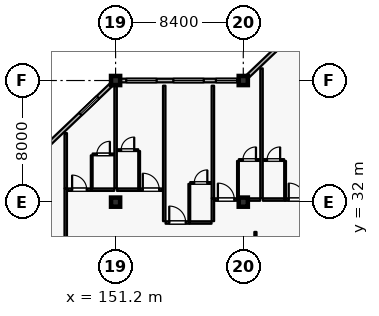
"""IFC4 building model, lengths in metres.
Left out: names, types, materials, properties, quantities, classifications, styles, units other than length and angle.
Written with IfcOpenShell. Run it as: python <this file> out.ifc"""

import sys

from ifc_helpers import new_model, si_unit, direction, frame, frame_2d, origin, origin_2d, place, context, subcontext, project, spatial, rectangle, extrude, element, fill, save


model = new_model("IFC4")
c1 = context("Model", 3, precision=1e-05, world=origin(), true_north=direction((0.0, 1.0)))
c2 = subcontext(c1, "Body", "Model", "MODEL_VIEW")
j1 = project(units=[si_unit("LENGTHUNIT", "METRE"), si_unit("PLANEANGLEUNIT", "RADIAN")], contexts=[c1])
p1 = place(None, origin())
s1 = spatial("IfcSite", under=j1, at=p1, CompositionType="ELEMENT")
p2 = place(p1, origin())
s2 = spatial("IfcBuilding", under=s1, at=p2, CompositionType="ELEMENT")
p3 = place(p2, frame((0.0, 0.0, 39.6)))
s3 = spatial("IfcBuildingStorey", under=s2, at=p3, CompositionType="ELEMENT", Elevation=39.6)
for number, where, z_axis, x_axis in (
    (1, (151.2, 40.0, 0.0), (0.0, 0.0, 1.0), (1.0, 0.0, 0.0)),
    (2, (159.6, 40.0, 0.0), (0.0, 0.0, 1.0), (1.0, 0.0, 0.0)),
    (3, (151.2, 32.0, 0.0), (0.0, 0.0, 1.0), (1.0, 0.0, 0.0)),
    (4, (159.6, 32.0, 0.0), (0.0, 0.0, 1.0), (1.0, 0.0, 0.0)),
):
    element("IfcColumn", number, at=place(p3, frame(where, z_axis=z_axis, x_axis=x_axis)), inside=s3, PredefinedType="COLUMN", context=c2, shape_type="SweptSolid", body=[
        extrude(rectangle(XDim=0.6, YDim=0.6, at=origin_2d()), origin(), (0.0, 0.0, 1.0), 3.6),
    ])
p4 = place(p3, frame((143.1, 32.286, 0.0), z_axis=(0.0, 0.0, 1.0), x_axis=(0.724145477467, 0.689647248573, 0.0)))
e5 = element("IfcWall", 5, at=p4, inside=s3, PredefinedType="SOLIDWALL", context=c2, shape_type="SweptSolid", body=[
    extrude(rectangle(XDim=10.771, YDim=0.24, at=frame_2d((5.385, 0.0))), origin(), (0.0, 0.0, 1.0), 2.94),
])
p5 = place(p4, frame((0.194, 0.0, 0.8)))
e6 = element("IfcOpeningElement", 6, at=p5, cuts=e5, PredefinedType="OPENING", context=c2, shape_type="SweptSolid", body=[
    extrude(rectangle(XDim=1.6, YDim=1.6, at=frame_2d((0.8, 0.8))), frame((0.0, 0.13, 0.0), z_axis=(0.0, -1.0, 0.0), x_axis=(1.0, 0.0, 0.0)), (0.0, 0.0, 1.0), 0.26),
])
p6 = place(p4, frame((3.591, 0.0, 0.8)))
e7 = element("IfcOpeningElement", 7, at=p6, cuts=e5, PredefinedType="OPENING", context=c2, shape_type="SweptSolid", body=[
    extrude(rectangle(XDim=1.6, YDim=1.6, at=frame_2d((0.8, 0.8))), frame((0.0, 0.13, 0.0), z_axis=(0.0, -1.0, 0.0), x_axis=(1.0, 0.0, 0.0)), (0.0, 0.0, 1.0), 0.26),
])
p7 = place(p4, frame((7.983, 0.0, 0.8)))
e8 = element("IfcOpeningElement", 8, at=p7, cuts=e5, PredefinedType="OPENING", context=c2, shape_type="SweptSolid", body=[
    extrude(rectangle(XDim=1.6, YDim=1.6, at=frame_2d((0.8, 0.8))), frame((0.0, 0.13, 0.0), z_axis=(0.0, -1.0, 0.0), x_axis=(1.0, 0.0, 0.0)), (0.0, 0.0, 1.0), 0.26),
])
p8 = place(p3, frame((151.5, 40.0, 0.0), z_axis=(0.0, 0.0, 1.0), x_axis=(1.0, 0.0, 0.0)))
e9 = element("IfcWall", 9, at=p8, inside=s3, PredefinedType="SOLIDWALL", context=c2, shape_type="SweptSolid", body=[
    extrude(rectangle(XDim=7.8, YDim=0.24, at=frame_2d((3.9, 0.0))), origin(), (0.0, 0.0, 1.0), 2.94),
])
p9 = place(p8, frame((0.4, 0.0, 0.8)))
e10 = element("IfcOpeningElement", 10, at=p9, cuts=e9, PredefinedType="OPENING", context=c2, shape_type="SweptSolid", body=[
    extrude(rectangle(XDim=2.0, YDim=1.75, at=frame_2d((1.0, 0.875))), frame((0.0, 0.13, 0.0), z_axis=(0.0, -1.0, 0.0), x_axis=(1.0, 0.0, 0.0)), (0.0, 0.0, 1.0), 0.26),
])
p10 = place(p8, frame((3.5, 0.0, 0.8)))
e11 = element("IfcOpeningElement", 11, at=p10, cuts=e9, PredefinedType="OPENING", context=c2, shape_type="SweptSolid", body=[
    extrude(rectangle(XDim=2.0, YDim=1.75, at=frame_2d((1.0, 0.875))), frame((0.0, 0.13, 0.0), z_axis=(0.0, -1.0, 0.0), x_axis=(1.0, 0.0, 0.0)), (0.0, 0.0, 1.0), 0.26),
])
p11 = place(p8, frame((6.3, 0.0, 0.8)))
e12 = element("IfcOpeningElement", 12, at=p11, cuts=e9, PredefinedType="OPENING", context=c2, shape_type="SweptSolid", body=[
    extrude(rectangle(XDim=1.4, YDim=1.6, at=frame_2d((0.7, 0.8))), frame((0.0, 0.13, 0.0), z_axis=(0.0, -1.0, 0.0), x_axis=(1.0, 0.0, 0.0)), (0.0, 0.0, 1.0), 0.26),
])
p12 = place(p3, frame((159.9, 40.286, 0.0), z_axis=(0.0, 0.0, 1.0), x_axis=(0.724156257633, 0.689635928973, 0.0)))
e13 = element("IfcWall", 13, at=p12, inside=s3, PredefinedType="SOLIDWALL", context=c2, shape_type="SweptSolid", body=[
    extrude(rectangle(XDim=10.771, YDim=0.24, at=frame_2d((5.386, 0.0))), origin(), (0.0, 0.0, 1.0), 2.94),
])
p13 = place(p12, frame((2.452, 0.0, 0.8)))
e14 = element("IfcOpeningElement", 14, at=p13, cuts=e13, PredefinedType="OPENING", context=c2, shape_type="SweptSolid", body=[
    extrude(rectangle(XDim=2.0, YDim=1.75, at=frame_2d((1.0, 0.875))), frame((0.0, 0.13, 0.0), z_axis=(0.0, -1.0, 0.0), x_axis=(1.0, 0.0, 0.0)), (0.0, 0.0, 1.0), 0.26),
])
p14 = place(p12, frame((6.871, 0.0, 0.8)))
e15 = element("IfcOpeningElement", 15, at=p14, cuts=e13, PredefinedType="OPENING", context=c2, shape_type="SweptSolid", body=[
    extrude(rectangle(XDim=2.0, YDim=1.75, at=frame_2d((1.0, 0.875))), frame((0.0, 0.13, 0.0), z_axis=(0.0, -1.0, 0.0), x_axis=(1.0, 0.0, 0.0)), (0.0, 0.0, 1.0), 0.26),
])
p15 = place(p3, frame((147.92, 28.46, 0.0), z_axis=(0.0, 0.0, 1.0), x_axis=(0.0, 1.0, 0.0)))
e16 = element("IfcWall", 16, at=p15, inside=s3, PredefinedType="PARTITIONING", context=c2, shape_type="SweptSolid", body=[
    extrude(rectangle(XDim=4.44, YDim=0.16, at=frame_2d((2.22, 0.0))), origin(), (0.0, 0.0, 1.0), 3.335),
])
p16 = place(p3, frame((148.01, 32.82, 0.0), z_axis=(0.0, 0.0, 1.0), x_axis=(1.0, 0.0, 0.0)))
e17 = element("IfcWall", 17, at=p16, inside=s3, PredefinedType="PARTITIONING", context=c2, shape_type="SweptSolid", body=[
    extrude(rectangle(XDim=1.62, YDim=0.16, at=frame_2d((0.81, 0.0))), origin(), (0.0, 0.0, 1.0), 3.335),
])
p17 = place(p16, frame((0.33, 0.0, 0.0)))
e18 = element("IfcOpeningElement", 18, at=p17, cuts=e17, PredefinedType="OPENING", context=c2, shape_type="SweptSolid", body=[
    extrude(rectangle(XDim=0.96, YDim=2.2, at=frame_2d((0.48, 1.1))), frame((0.0, 0.09, 0.0), z_axis=(0.0, -1.0, 0.0), x_axis=(1.0, 0.0, 0.0)), (0.0, 0.0, 1.0), 0.18),
])
p18 = place(p3, frame((149.64, 32.82, 0.0), z_axis=(0.0, 0.0, 1.0), x_axis=(1.0, 0.0, 0.0)))
e19 = element("IfcWall", 19, at=p18, inside=s3, PredefinedType="PARTITIONING", context=c2, shape_type="SweptSolid", body=[
    extrude(rectangle(XDim=1.47, YDim=0.16, at=frame_2d((0.735, 0.0))), origin(), (0.0, 0.0, 1.0), 3.335),
])
p19 = place(p3, frame((149.63, 32.91, 0.0), z_axis=(0.0, 0.0, 1.0), x_axis=(0.0, 1.0, 0.0)))
e20 = element("IfcWall", 20, at=p19, inside=s3, PredefinedType="PARTITIONING", context=c2, shape_type="SweptSolid", body=[
    extrude(rectangle(XDim=2.17, YDim=0.115, at=frame_2d((1.085, 0.0))), origin(), (0.0, 0.0, 1.0), 3.335),
])
p20 = place(p3, frame((149.69, 35.14, 0.0), z_axis=(0.0, 0.0, 1.0), x_axis=(1.0, 0.0, 0.0)))
e21 = element("IfcWall", 21, at=p20, inside=s3, PredefinedType="PARTITIONING", context=c2, shape_type="SweptSolid", body=[
    extrude(rectangle(XDim=1.41, YDim=0.115, at=frame_2d((0.705, 0.0))), origin(), (0.0, 0.0, 1.0), 3.335),
])
p21 = place(p20, frame((0.275, 0.0, 0.0)))
e22 = element("IfcOpeningElement", 22, at=p21, cuts=e21, PredefinedType="OPENING", context=c2, shape_type="SweptSolid", body=[
    extrude(rectangle(XDim=0.86, YDim=2.12, at=frame_2d((0.43, 1.06))), frame((0.0, 0.067, 0.0), z_axis=(0.0, -1.0, 0.0), x_axis=(1.0, 0.0, 0.0)), (0.0, 0.0, 1.0), 0.135),
])
p22 = place(p3, frame((147.92, 32.91, 0.0), z_axis=(0.0, 0.0, 1.0), x_axis=(0.0, 1.0, 0.0)))
e23 = element("IfcWall", 23, at=p22, inside=s3, PredefinedType="PARTITIONING", context=c2, shape_type="SweptSolid", body=[
    extrude(rectangle(XDim=3.63, YDim=0.16, at=frame_2d((1.815, 0.0))), origin(), (0.0, 0.0, 1.0), 3.335),
])
p23 = place(p3, frame((151.29, 32.82, 0.0), z_axis=(0.0, 0.0, 1.0), x_axis=(1.0, 0.0, 0.0)))
e24 = element("IfcWall", 24, at=p23, inside=s3, PredefinedType="PARTITIONING", context=c2, shape_type="SweptSolid", body=[
    extrude(rectangle(XDim=1.45, YDim=0.16, at=frame_2d((0.725, 0.0))), origin(), (0.0, 0.0, 1.0), 3.335),
])
p24 = place(p3, frame((152.75, 32.82, 0.0), z_axis=(0.0, 0.0, 1.0), x_axis=(1.0, 0.0, 0.0)))
e25 = element("IfcWall", 25, at=p24, inside=s3, PredefinedType="PARTITIONING", context=c2, shape_type="SweptSolid", body=[
    extrude(rectangle(XDim=1.56, YDim=0.16, at=frame_2d((0.78, 0.0))), origin(), (0.0, 0.0, 1.0), 3.335),
])
p25 = place(p24, frame((0.24, 0.0, 0.0)))
e26 = element("IfcOpeningElement", 26, at=p25, cuts=e25, PredefinedType="OPENING", context=c2, shape_type="SweptSolid", body=[
    extrude(rectangle(XDim=1.08, YDim=2.3, at=frame_2d((0.54, 1.15))), frame((0.0, 0.09, 0.0), z_axis=(0.0, -1.0, 0.0), x_axis=(1.0, 0.0, 0.0)), (0.0, 0.0, 1.0), 0.18),
])
p26 = place(p3, frame((152.75, 32.91, 0.0), z_axis=(0.0, 0.0, 1.0), x_axis=(0.0, 1.0, 0.0)))
e27 = element("IfcWall", 27, at=p26, inside=s3, PredefinedType="PARTITIONING", context=c2, shape_type="SweptSolid", body=[
    extrude(rectangle(XDim=2.45, YDim=0.115, at=frame_2d((1.225, 0.0))), origin(), (0.0, 0.0, 1.0), 3.335),
])
p27 = place(p3, frame((151.3, 35.42, 0.0), z_axis=(0.0, 0.0, 1.0), x_axis=(1.0, 0.0, 0.0)))
e28 = element("IfcWall", 28, at=p27, inside=s3, PredefinedType="PARTITIONING", context=c2, shape_type="SweptSolid", body=[
    extrude(rectangle(XDim=1.39, YDim=0.115, at=frame_2d((0.695, 0.0))), origin(), (0.0, 0.0, 1.0), 3.335),
])
p28 = place(p27, frame((0.265, 0.0, 0.0)))
e29 = element("IfcOpeningElement", 29, at=p28, cuts=e28, PredefinedType="OPENING", context=c2, shape_type="SweptSolid", body=[
    extrude(rectangle(XDim=0.86, YDim=2.12, at=frame_2d((0.43, 1.06))), frame((0.0, 0.067, 0.0), z_axis=(0.0, -1.0, 0.0), x_axis=(1.0, 0.0, 0.0)), (0.0, 0.0, 1.0), 0.135),
])
p29 = place(p3, frame((151.2, 32.91, 0.0), z_axis=(0.0, 0.0, 1.0), x_axis=(0.0, 1.0, 0.0)))
e30 = element("IfcWall", 30, at=p29, inside=s3, PredefinedType="PARTITIONING", context=c2, shape_type="SweptSolid", body=[
    extrude(rectangle(XDim=6.75, YDim=0.16, at=frame_2d((3.375, 0.0))), origin(), (0.0, 0.0, 1.0), 2.74),
])
p30 = place(p3, frame((154.49, 30.66, 0.0), z_axis=(0.0, 0.0, 1.0), x_axis=(1.0, 0.0, 0.0)))
e31 = element("IfcWall", 31, at=p30, inside=s3, PredefinedType="PARTITIONING", context=c2, shape_type="SweptSolid", body=[
    extrude(rectangle(XDim=1.56, YDim=0.16, at=frame_2d((0.78, 0.0))), origin(), (0.0, 0.0, 1.0), 3.335),
])
p31 = place(p30, frame((0.24, 0.0, 0.0)))
e32 = element("IfcOpeningElement", 32, at=p31, cuts=e31, PredefinedType="OPENING", context=c2, shape_type="SweptSolid", body=[
    extrude(rectangle(XDim=1.08, YDim=2.3, at=frame_2d((0.54, 1.15))), frame((0.0, 0.09, 0.0), z_axis=(0.0, -1.0, 0.0), x_axis=(1.0, 0.0, 0.0)), (0.0, 0.0, 1.0), 0.18),
])
p32 = place(p3, frame((156.06, 30.66, 0.0), z_axis=(0.0, 0.0, 1.0), x_axis=(1.0, 0.0, 0.0)))
e33 = element("IfcWall", 33, at=p32, inside=s3, PredefinedType="PARTITIONING", context=c2, shape_type="SweptSolid", body=[
    extrude(rectangle(XDim=1.45, YDim=0.16, at=frame_2d((0.725, 0.0))), origin(), (0.0, 0.0, 1.0), 3.335),
])
p33 = place(p3, frame((156.05, 30.75, 0.0), z_axis=(0.0, 0.0, 1.0), x_axis=(0.0, 1.0, 0.0)))
e34 = element("IfcWall", 34, at=p33, inside=s3, PredefinedType="PARTITIONING", context=c2, shape_type="SweptSolid", body=[
    extrude(rectangle(XDim=2.45, YDim=0.115, at=frame_2d((1.225, 0.0))), origin(), (0.0, 0.0, 1.0), 3.335),
])
p34 = place(p3, frame((156.11, 33.26, 0.0), z_axis=(0.0, 0.0, 1.0), x_axis=(1.0, 0.0, 0.0)))
e35 = element("IfcWall", 35, at=p34, inside=s3, PredefinedType="PARTITIONING", context=c2, shape_type="SweptSolid", body=[
    extrude(rectangle(XDim=1.39, YDim=0.115, at=frame_2d((0.695, 0.0))), origin(), (0.0, 0.0, 1.0), 3.335),
])
p35 = place(p34, frame((0.265, 0.0, 0.0)))
e36 = element("IfcOpeningElement", 36, at=p35, cuts=e35, PredefinedType="OPENING", context=c2, shape_type="SweptSolid", body=[
    extrude(rectangle(XDim=0.86, YDim=2.12, at=frame_2d((0.43, 1.06))), frame((0.0, 0.067, 0.0), z_axis=(0.0, -1.0, 0.0), x_axis=(1.0, 0.0, 0.0)), (0.0, 0.0, 1.0), 0.135),
])
p36 = place(p3, frame((154.4, 30.75, 0.0), z_axis=(0.0, 0.0, 1.0), x_axis=(0.0, 1.0, 0.0)))
e37 = element("IfcWall", 37, at=p36, inside=s3, PredefinedType="PARTITIONING", context=c2, shape_type="SweptSolid", body=[
    extrude(rectangle(XDim=8.91, YDim=0.16, at=frame_2d((4.455, 0.0))), origin(), (0.0, 0.0, 1.0), 3.335),
])
p37 = place(p3, frame((157.6, 30.75, 0.0), z_axis=(0.0, 0.0, 1.0), x_axis=(0.0, 1.0, 0.0)))
e38 = element("IfcWall", 38, at=p37, inside=s3, PredefinedType="PARTITIONING", context=c2, shape_type="SweptSolid", body=[
    extrude(rectangle(XDim=1.5, YDim=0.16, at=frame_2d((0.75, 0.0))), origin(), (0.0, 0.0, 1.0), 3.335),
])
p38 = place(p3, frame((157.69, 32.17, 0.0), z_axis=(0.0, 0.0, 1.0), x_axis=(1.0, 0.0, 0.0)))
e39 = element("IfcWall", 39, at=p38, inside=s3, PredefinedType="PARTITIONING", context=c2, shape_type="SweptSolid", body=[
    extrude(rectangle(XDim=1.56, YDim=0.16, at=frame_2d((0.78, 0.0))), origin(), (0.0, 0.0, 1.0), 2.84),
])
p39 = place(p38, frame((0.24, 0.0, 0.0)))
e40 = element("IfcOpeningElement", 40, at=p39, cuts=e39, PredefinedType="OPENING", context=c2, shape_type="SweptSolid", body=[
    extrude(rectangle(XDim=1.08, YDim=2.3, at=frame_2d((0.54, 1.15))), frame((0.0, 0.09, 0.0), z_axis=(0.0, -1.0, 0.0), x_axis=(1.0, 0.0, 0.0)), (0.0, 0.0, 1.0), 0.18),
])
p40 = place(p3, frame((159.26, 32.17, 0.0), z_axis=(0.0, 0.0, 1.0), x_axis=(1.0, 0.0, 0.0)))
e41 = element("IfcWall", 41, at=p40, inside=s3, PredefinedType="PARTITIONING", context=c2, shape_type="SweptSolid", body=[
    extrude(rectangle(XDim=1.45, YDim=0.16, at=frame_2d((0.725, 0.0))), origin(), (0.0, 0.0, 1.0), 3.335),
])
p41 = place(p3, frame((159.25, 32.26, 0.0), z_axis=(0.0, 0.0, 1.0), x_axis=(0.0, 1.0, 0.0)))
e42 = element("IfcWall", 42, at=p41, inside=s3, PredefinedType="PARTITIONING", context=c2, shape_type="SweptSolid", body=[
    extrude(rectangle(XDim=2.45, YDim=0.115, at=frame_2d((1.225, 0.0))), origin(), (0.0, 0.0, 1.0), 3.335),
])
p42 = place(p3, frame((159.31, 34.77, 0.0), z_axis=(0.0, 0.0, 1.0), x_axis=(1.0, 0.0, 0.0)))
e43 = element("IfcWall", 43, at=p42, inside=s3, PredefinedType="PARTITIONING", context=c2, shape_type="SweptSolid", body=[
    extrude(rectangle(XDim=1.39, YDim=0.115, at=frame_2d((0.695, 0.0))), origin(), (0.0, 0.0, 1.0), 3.335),
])
p43 = place(p42, frame((0.265, 0.0, 0.0)))
e44 = element("IfcOpeningElement", 44, at=p43, cuts=e43, PredefinedType="OPENING", context=c2, shape_type="SweptSolid", body=[
    extrude(rectangle(XDim=0.86, YDim=2.12, at=frame_2d((0.43, 1.06))), frame((0.0, 0.067, 0.0), z_axis=(0.0, -1.0, 0.0), x_axis=(1.0, 0.0, 0.0)), (0.0, 0.0, 1.0), 0.135),
])
p44 = place(p3, frame((157.6, 32.26, 0.0), z_axis=(0.0, 0.0, 1.0), x_axis=(0.0, 1.0, 0.0)))
e45 = element("IfcWall", 45, at=p44, inside=s3, PredefinedType="PARTITIONING", context=c2, shape_type="SweptSolid", body=[
    extrude(rectangle(XDim=7.4, YDim=0.16, at=frame_2d((3.7, 0.0))), origin(), (0.0, 0.0, 1.0), 3.335),
])
p45 = place(p3, frame((160.89, 32.17, 0.0), z_axis=(0.0, 0.0, 1.0), x_axis=(1.0, 0.0, 0.0)))
e46 = element("IfcWall", 46, at=p45, inside=s3, PredefinedType="PARTITIONING", context=c2, shape_type="SweptSolid", body=[
    extrude(rectangle(XDim=1.45, YDim=0.16, at=frame_2d((0.725, 0.0))), origin(), (0.0, 0.0, 1.0), 3.335),
])
p46 = place(p3, frame((162.35, 32.17, 0.0), z_axis=(0.0, 0.0, 1.0), x_axis=(1.0, 0.0, 0.0)))
e47 = element("IfcWall", 47, at=p46, inside=s3, PredefinedType="PARTITIONING", context=c2, shape_type="SweptSolid", body=[
    extrude(rectangle(XDim=1.56, YDim=0.16, at=frame_2d((0.78, 0.0))), origin(), (0.0, 0.0, 1.0), 3.335),
])
p47 = place(p46, frame((0.24, 0.0, 0.0)))
e48 = element("IfcOpeningElement", 48, at=p47, cuts=e47, PredefinedType="OPENING", context=c2, shape_type="SweptSolid", body=[
    extrude(rectangle(XDim=1.08, YDim=2.3, at=frame_2d((0.54, 1.15))), frame((0.0, 0.09, 0.0), z_axis=(0.0, -1.0, 0.0), x_axis=(1.0, 0.0, 0.0)), (0.0, 0.0, 1.0), 0.18),
])
p48 = place(p3, frame((162.35, 32.26, 0.0), z_axis=(0.0, 0.0, 1.0), x_axis=(0.0, 1.0, 0.0)))
e49 = element("IfcWall", 49, at=p48, inside=s3, PredefinedType="PARTITIONING", context=c2, shape_type="SweptSolid", body=[
    extrude(rectangle(XDim=2.45, YDim=0.115, at=frame_2d((1.225, 0.0))), origin(), (0.0, 0.0, 1.0), 3.335),
])
p49 = place(p3, frame((160.9, 34.77, 0.0), z_axis=(0.0, 0.0, 1.0), x_axis=(1.0, 0.0, 0.0)))
e50 = element("IfcWall", 50, at=p49, inside=s3, PredefinedType="PARTITIONING", context=c2, shape_type="SweptSolid", body=[
    extrude(rectangle(XDim=1.39, YDim=0.115, at=frame_2d((0.695, 0.0))), origin(), (0.0, 0.0, 1.0), 3.335),
])
p50 = place(p49, frame((0.265, 0.0, 0.0)))
e51 = element("IfcOpeningElement", 51, at=p50, cuts=e50, PredefinedType="OPENING", context=c2, shape_type="SweptSolid", body=[
    extrude(rectangle(XDim=0.86, YDim=2.12, at=frame_2d((0.43, 1.06))), frame((0.0, 0.067, 0.0), z_axis=(0.0, -1.0, 0.0), x_axis=(1.0, 0.0, 0.0)), (0.0, 0.0, 1.0), 0.135),
])
p51 = place(p3, frame((160.8, 32.26, 0.0), z_axis=(0.0, 0.0, 1.0), x_axis=(0.0, 1.0, 0.0)))
e52 = element("IfcWall", 52, at=p51, inside=s3, PredefinedType="PARTITIONING", context=c2, shape_type="SweptSolid", body=[
    extrude(rectangle(XDim=8.54, YDim=0.16, at=frame_2d((4.27, 0.0))), origin(), (0.0, 0.0, 1.0), 3.335),
])
p52 = place(p3, frame((160.4, 24.96, 0.0), z_axis=(0.0, 0.0, 1.0), x_axis=(0.0, 1.0, 0.0)))
e53 = element("IfcWall", 53, at=p52, inside=s3, PredefinedType="PARTITIONING", context=c2, shape_type="SweptSolid", body=[
    extrude(rectangle(XDim=5.08, YDim=0.14, at=frame_2d((2.54, 0.0))), origin(), (0.0, 0.0, 1.0), 3.335),
])
p53 = place(p52, frame((1.59, 0.0, 0.0)))
e54 = element("IfcOpeningElement", 54, at=p53, cuts=e53, PredefinedType="OPENING", context=c2, shape_type="SweptSolid", body=[
    extrude(rectangle(XDim=1.9, YDim=2.4, at=frame_2d((0.95, 1.2))), frame((0.0, 0.08, 0.0), z_axis=(0.0, -1.0, 0.0), x_axis=(1.0, 0.0, 0.0)), (0.0, 0.0, 1.0), 0.16),
])
p54 = place(p7, origin())
e55 = element("IfcWindow", 55, at=p54, inside=s3, PartitioningType="SINGLE_PANEL", PredefinedType="WINDOW", context=c2, shape_type="SweptSolid", body=[
    extrude(rectangle(XDim=1.6, YDim=1.6, at=frame_2d((0.8, 0.8))), frame((0.0, 0.03, 0.0), z_axis=(0.0, -1.0, 0.0), x_axis=(1.0, 0.0, 0.0)), (0.0, 0.0, 1.0), 0.06),
])
fill(e8, e55)
p55 = place(p9, origin())
e56 = element("IfcWindow", 56, at=p55, inside=s3, PartitioningType="DOUBLE_PANEL_VERTICAL", PredefinedType="WINDOW", context=c2, shape_type="SweptSolid", body=[
    extrude(rectangle(XDim=2.0, YDim=1.75, at=frame_2d((1.0, 0.875))), frame((0.0, 0.03, 0.0), z_axis=(0.0, -1.0, 0.0), x_axis=(1.0, 0.0, 0.0)), (0.0, 0.0, 1.0), 0.06),
])
fill(e10, e56)
p56 = place(p10, origin())
e57 = element("IfcWindow", 57, at=p56, inside=s3, PartitioningType="DOUBLE_PANEL_VERTICAL", PredefinedType="WINDOW", context=c2, shape_type="SweptSolid", body=[
    extrude(rectangle(XDim=2.0, YDim=1.75, at=frame_2d((1.0, 0.875))), frame((0.0, 0.03, 0.0), z_axis=(0.0, -1.0, 0.0), x_axis=(1.0, 0.0, 0.0)), (0.0, 0.0, 1.0), 0.06),
])
fill(e11, e57)
p57 = place(p11, origin())
e58 = element("IfcWindow", 58, at=p57, inside=s3, PartitioningType="SINGLE_PANEL", PredefinedType="WINDOW", context=c2, shape_type="SweptSolid", body=[
    extrude(rectangle(XDim=1.4, YDim=1.6, at=frame_2d((0.7, 0.8))), frame((0.0, 0.03, 0.0), z_axis=(0.0, -1.0, 0.0), x_axis=(1.0, 0.0, 0.0)), (0.0, 0.0, 1.0), 0.06),
])
fill(e12, e58)
p58 = place(p17, origin())
e59 = element("IfcDoor", 59, at=p58, inside=s3, OperationType="SINGLE_SWING_LEFT", PredefinedType="DOOR", context=c2, shape_type="SweptSolid", body=[
    extrude(rectangle(XDim=0.96, YDim=2.2, at=frame_2d((0.48, 1.1))), frame((0.0, 0.025, 0.0), z_axis=(0.0, -1.0, 0.0), x_axis=(1.0, 0.0, 0.0)), (0.0, 0.0, 1.0), 0.05),
])
fill(e18, e59)
p59 = place(p21, origin())
e60 = element("IfcDoor", 60, at=p59, inside=s3, OperationType="SINGLE_SWING_RIGHT", PredefinedType="DOOR", context=c2, shape_type="SweptSolid", body=[
    extrude(rectangle(XDim=0.86, YDim=2.12, at=frame_2d((0.43, 1.06))), frame((0.0, 0.025, 0.0), z_axis=(0.0, -1.0, 0.0), x_axis=(1.0, 0.0, 0.0)), (0.0, 0.0, 1.0), 0.05),
])
fill(e22, e60)
p60 = place(p25, origin())
e61 = element("IfcDoor", 61, at=p60, inside=s3, OperationType="SINGLE_SWING_LEFT", PredefinedType="DOOR", context=c2, shape_type="SweptSolid", body=[
    extrude(rectangle(XDim=1.08, YDim=2.3, at=frame_2d((0.54, 1.15))), frame((0.0, 0.025, 0.0), z_axis=(0.0, -1.0, 0.0), x_axis=(1.0, 0.0, 0.0)), (0.0, 0.0, 1.0), 0.05),
])
fill(e26, e61)
p61 = place(p28, origin())
e62 = element("IfcDoor", 62, at=p61, inside=s3, OperationType="SINGLE_SWING_RIGHT", PredefinedType="DOOR", context=c2, shape_type="SweptSolid", body=[
    extrude(rectangle(XDim=0.86, YDim=2.12, at=frame_2d((0.43, 1.06))), frame((0.0, 0.025, 0.0), z_axis=(0.0, -1.0, 0.0), x_axis=(1.0, 0.0, 0.0)), (0.0, 0.0, 1.0), 0.05),
])
fill(e29, e62)
p62 = place(p31, origin())
e63 = element("IfcDoor", 63, at=p62, inside=s3, OperationType="SINGLE_SWING_LEFT", PredefinedType="DOOR", context=c2, shape_type="SweptSolid", body=[
    extrude(rectangle(XDim=1.08, YDim=2.3, at=frame_2d((0.54, 1.15))), frame((0.0, 0.025, 0.0), z_axis=(0.0, -1.0, 0.0), x_axis=(1.0, 0.0, 0.0)), (0.0, 0.0, 1.0), 0.05),
])
fill(e32, e63)
p63 = place(p35, origin())
e64 = element("IfcDoor", 64, at=p63, inside=s3, OperationType="SINGLE_SWING_RIGHT", PredefinedType="DOOR", context=c2, shape_type="SweptSolid", body=[
    extrude(rectangle(XDim=0.86, YDim=2.12, at=frame_2d((0.43, 1.06))), frame((0.0, 0.025, 0.0), z_axis=(0.0, -1.0, 0.0), x_axis=(1.0, 0.0, 0.0)), (0.0, 0.0, 1.0), 0.05),
])
fill(e36, e64)
p64 = place(p39, origin())
e65 = element("IfcDoor", 65, at=p64, inside=s3, OperationType="SINGLE_SWING_LEFT", PredefinedType="DOOR", context=c2, shape_type="SweptSolid", body=[
    extrude(rectangle(XDim=1.08, YDim=2.3, at=frame_2d((0.54, 1.15))), frame((0.0, 0.025, 0.0), z_axis=(0.0, -1.0, 0.0), x_axis=(1.0, 0.0, 0.0)), (0.0, 0.0, 1.0), 0.05),
])
fill(e40, e65)
p65 = place(p43, origin())
e66 = element("IfcDoor", 66, at=p65, inside=s3, OperationType="SINGLE_SWING_RIGHT", PredefinedType="DOOR", context=c2, shape_type="SweptSolid", body=[
    extrude(rectangle(XDim=0.86, YDim=2.12, at=frame_2d((0.43, 1.06))), frame((0.0, 0.025, 0.0), z_axis=(0.0, -1.0, 0.0), x_axis=(1.0, 0.0, 0.0)), (0.0, 0.0, 1.0), 0.05),
])
fill(e44, e66)
p66 = place(p47, origin())
e67 = element("IfcDoor", 67, at=p66, inside=s3, OperationType="SINGLE_SWING_LEFT", PredefinedType="DOOR", context=c2, shape_type="SweptSolid", body=[
    extrude(rectangle(XDim=1.08, YDim=2.3, at=frame_2d((0.54, 1.15))), frame((0.0, 0.025, 0.0), z_axis=(0.0, -1.0, 0.0), x_axis=(1.0, 0.0, 0.0)), (0.0, 0.0, 1.0), 0.05),
])
fill(e48, e67)
p67 = place(p50, origin())
e68 = element("IfcDoor", 68, at=p67, inside=s3, OperationType="SINGLE_SWING_RIGHT", PredefinedType="DOOR", context=c2, shape_type="SweptSolid", body=[
    extrude(rectangle(XDim=0.86, YDim=2.12, at=frame_2d((0.43, 1.06))), frame((0.0, 0.025, 0.0), z_axis=(0.0, -1.0, 0.0), x_axis=(1.0, 0.0, 0.0)), (0.0, 0.0, 1.0), 0.05),
])
fill(e51, e68)
save(model, sys.argv[1])
